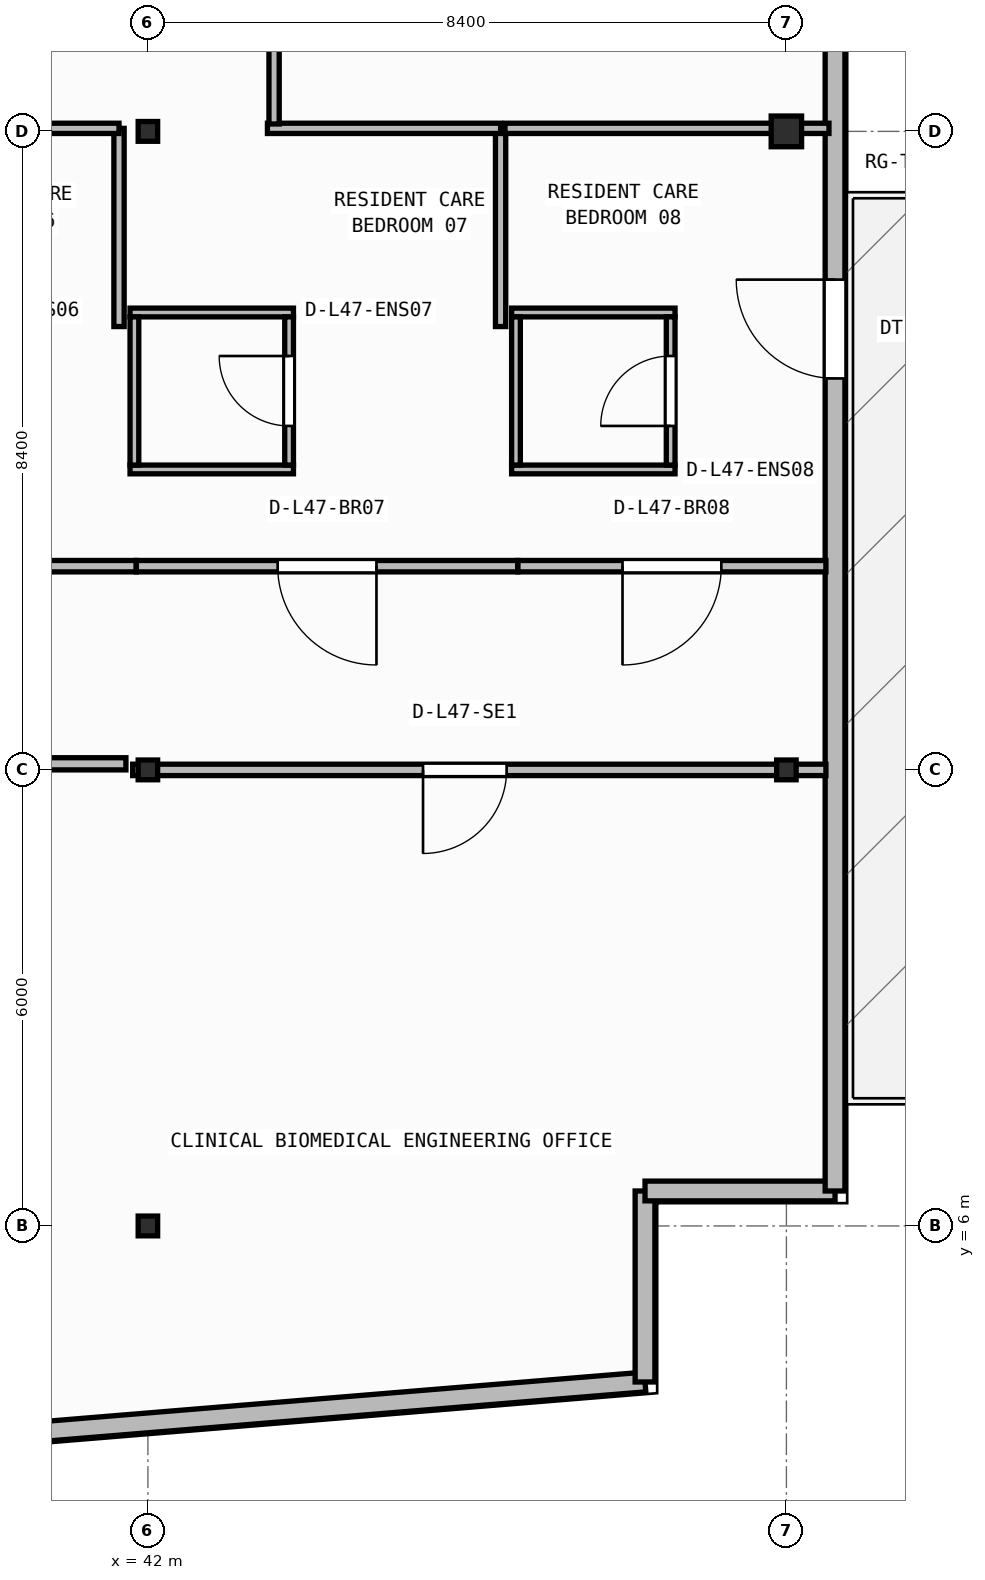
"""IFC4 building model, lengths in metres.
Left out: names, types, materials, properties, quantities, classifications, styles, units other than length and angle.
Written with IfcOpenShell. Run it as: python <this file> out.ifc"""

import sys

from ifc_helpers import new_model, si_unit, direction, frame, frame_2d, origin, origin_2d, place, context, subcontext, project, spatial, rectangle, i_section, extrude, element, fill, save


model = new_model("IFC4")
c1 = context("Model", 3, precision=1e-05, world=origin(), true_north=direction((0.0, 1.0)))
c2 = subcontext(c1, "Body", "Model", "MODEL_VIEW")
j1 = project(units=[si_unit("LENGTHUNIT", "METRE"), si_unit("PLANEANGLEUNIT", "RADIAN")], contexts=[c1])
p1 = place(None, origin())
s1 = spatial("IfcSite", under=j1, at=p1, CompositionType="ELEMENT")
p2 = place(p1, origin())
s2 = spatial("IfcBuilding", under=s1, at=p2, CompositionType="ELEMENT")
p3 = place(p2, frame((0.0, 0.0, 192.1)))
s3 = spatial("IfcBuildingStorey", under=s2, at=p3, CompositionType="ELEMENT", Elevation=192.1)
for number, where, z_axis, x_axis in (
    (1, (42.0, 6.0, 0.0), (0.0, 0.0, 1.0), (1.0, 0.0, 0.0)),
    (2, (42.0, 12.0, 0.0), (0.0, 0.0, 1.0), (1.0, 0.0, 0.0)),
    (3, (50.4, 12.0, 0.0), (0.0, 0.0, 1.0), (1.0, 0.0, 0.0)),
    (4, (42.0, 20.4, 0.0), (0.0, 0.0, 1.0), (1.0, 0.0, 0.0)),
):
    element("IfcColumn", number, at=place(p3, frame(where, z_axis=z_axis, x_axis=x_axis)), inside=s3, PredefinedType="COLUMN", context=c2, shape_type="SweptSolid", body=[
        extrude(i_section(OverallWidth=0.256, OverallDepth=0.26, WebThickness=0.01, FlangeThickness=0.017, FilletRadius=0.013, at=origin_2d()), origin(), (0.0, 0.0, 1.0), 3.95),
    ])
p4 = place(p3, frame((50.4, 20.4, 0.0), z_axis=(0.0, 0.0, 1.0), x_axis=(1.0, 0.0, 0.0)))
e5 = element("IfcColumn", 5, at=p4, inside=s3, PredefinedType="COLUMN", context=c2, shape_type="SweptSolid", body=[
    extrude(i_section(OverallWidth=0.4, OverallDepth=0.404, WebThickness=0.02, FlangeThickness=0.032, at=origin_2d()), origin(), (0.0, 0.0, 1.0), 3.95),
])
p5 = place(p3, frame((2.66, 0.174, 0.0), z_axis=(0.0, 0.0, 1.0), x_axis=(0.996634028439, 0.081979347142, 0.0)))
e6 = element("IfcWall", 6, at=p5, inside=s3, PredefinedType="STANDARD", context=c2, shape_type="SweptSolid", body=[
    extrude(rectangle(XDim=46.035, YDim=0.26, at=frame_2d((23.018, 0.0))), origin(), (0.0, 0.0, 1.0), 3.71),
])
p6 = place(p5, frame((21.817, 0.0, 0.9)))
e7 = element("IfcOpeningElement", 7, at=p6, cuts=e6, PredefinedType="OPENING", context=c2, shape_type="SweptSolid", body=[
    extrude(rectangle(XDim=2.4, YDim=1.65, at=frame_2d((1.2, 0.825))), frame((0.0, 0.14, 0.0), z_axis=(0.0, -1.0, 0.0), x_axis=(1.0, 0.0, 0.0)), (0.0, 0.0, 1.0), 0.28),
])
p7 = place(p3, frame((48.54, 3.948, 0.0), z_axis=(0.0, 0.0, 1.0), x_axis=(0.0, 1.0, 0.0)))
e8 = element("IfcWall", 8, at=p7, inside=s3, PredefinedType="STANDARD", context=c2, shape_type="SweptSolid", body=[
    extrude(rectangle(XDim=2.512, YDim=0.26, at=frame_2d((1.256, 0.0))), origin(), (0.0, 0.0, 1.0), 3.71),
])
p8 = place(p3, frame((48.54, 6.46, 0.0), z_axis=(0.0, 0.0, 1.0), x_axis=(1.0, 0.0, 0.0)))
e9 = element("IfcWall", 9, at=p8, inside=s3, PredefinedType="STANDARD", context=c2, shape_type="SweptSolid", body=[
    extrude(rectangle(XDim=2.5, YDim=0.26, at=frame_2d((1.25, 0.0))), origin(), (0.0, 0.0, 1.0), 3.71),
])
p9 = place(p3, frame((51.04, 6.46, 0.0), z_axis=(0.0, 0.0, 1.0), x_axis=(0.0, 1.0, 0.0)))
e10 = element("IfcWall", 10, at=p9, inside=s3, PredefinedType="STANDARD", context=c2, shape_type="SweptSolid", body=[
    extrude(rectangle(XDim=22.68, YDim=0.26, at=frame_2d((11.34, 0.0))), origin(), (0.0, 0.0, 1.0), 3.71),
])
p10 = place(p9, frame((10.69, 0.0, 0.0)))
e11 = element("IfcOpeningElement", 11, at=p10, cuts=e10, PredefinedType="OPENING", context=c2, shape_type="SweptSolid", body=[
    extrude(rectangle(XDim=1.3, YDim=2.15, at=frame_2d((0.65, 1.075))), frame((0.0, 0.14, 0.0), z_axis=(0.0, -1.0, 0.0), x_axis=(1.0, 0.0, 0.0)), (0.0, 0.0, 1.0), 0.28),
])
p11 = place(p3, frame((41.765, 15.952, 0.0), z_axis=(0.0, 0.0, 1.0), x_axis=(1.0, 0.0, 0.0)))
e12 = element("IfcWall", 12, at=p11, inside=s3, PredefinedType="PARTITIONING", context=c2, shape_type="SweptSolid", body=[
    extrude(rectangle(XDim=2.15, YDim=0.115, at=frame_2d((1.075, 0.0))), origin(), (0.0, 0.0, 1.0), 3.329),
])
p12 = place(p3, frame((41.765, 18.018, 0.0), z_axis=(0.0, 0.0, 1.0), x_axis=(1.0, 0.0, 0.0)))
e13 = element("IfcWall", 13, at=p12, inside=s3, PredefinedType="PARTITIONING", context=c2, shape_type="SweptSolid", body=[
    extrude(rectangle(XDim=2.15, YDim=0.115, at=frame_2d((1.075, 0.0))), origin(), (0.0, 0.0, 1.0), 3.71),
])
p13 = place(p3, frame((41.823, 16.01, 0.0), z_axis=(0.0, 0.0, 1.0), x_axis=(0.0, 1.0, 0.0)))
e14 = element("IfcWall", 14, at=p13, inside=s3, PredefinedType="PARTITIONING", context=c2, shape_type="SweptSolid", body=[
    extrude(rectangle(XDim=1.95, YDim=0.115, at=frame_2d((0.975, 0.0))), origin(), (0.0, 0.0, 1.0), 3.152),
])
p14 = place(p3, frame((43.857, 16.01, 0.0), z_axis=(0.0, 0.0, 1.0), x_axis=(0.0, 1.0, 0.0)))
e15 = element("IfcWall", 15, at=p14, inside=s3, PredefinedType="PARTITIONING", context=c2, shape_type="SweptSolid", body=[
    extrude(rectangle(XDim=1.95, YDim=0.115, at=frame_2d((0.975, 0.0))), origin(), (0.0, 0.0, 1.0), 3.71),
])
p15 = place(p14, frame((0.515, 0.0, 0.0)))
e16 = element("IfcOpeningElement", 16, at=p15, cuts=e15, PredefinedType="OPENING", context=c2, shape_type="SweptSolid", body=[
    extrude(rectangle(XDim=0.92, YDim=2.1, at=frame_2d((0.46, 1.05))), frame((0.0, 0.067, 0.0), z_axis=(0.0, -1.0, 0.0), x_axis=(1.0, 0.0, 0.0)), (0.0, 0.0, 1.0), 0.135),
])
p16 = place(p3, frame((46.785, 15.952, 0.0), z_axis=(0.0, 0.0, 1.0), x_axis=(1.0, 0.0, 0.0)))
e17 = element("IfcWall", 17, at=p16, inside=s3, PredefinedType="PARTITIONING", context=c2, shape_type="SweptSolid", body=[
    extrude(rectangle(XDim=2.15, YDim=0.115, at=frame_2d((1.075, 0.0))), origin(), (0.0, 0.0, 1.0), 3.329),
])
p17 = place(p3, frame((46.785, 18.018, 0.0), z_axis=(0.0, 0.0, 1.0), x_axis=(1.0, 0.0, 0.0)))
e18 = element("IfcWall", 18, at=p17, inside=s3, PredefinedType="PARTITIONING", context=c2, shape_type="SweptSolid", body=[
    extrude(rectangle(XDim=2.15, YDim=0.115, at=frame_2d((1.075, 0.0))), origin(), (0.0, 0.0, 1.0), 3.71),
])
p18 = place(p3, frame((46.843, 16.01, 0.0), z_axis=(0.0, 0.0, 1.0), x_axis=(0.0, 1.0, 0.0)))
e19 = element("IfcWall", 19, at=p18, inside=s3, PredefinedType="PARTITIONING", context=c2, shape_type="SweptSolid", body=[
    extrude(rectangle(XDim=1.95, YDim=0.115, at=frame_2d((0.975, 0.0))), origin(), (0.0, 0.0, 1.0), 3.71),
])
p19 = place(p3, frame((48.877, 16.01, 0.0), z_axis=(0.0, 0.0, 1.0), x_axis=(0.0, 1.0, 0.0)))
e20 = element("IfcWall", 20, at=p19, inside=s3, PredefinedType="PARTITIONING", context=c2, shape_type="SweptSolid", body=[
    extrude(rectangle(XDim=1.95, YDim=0.115, at=frame_2d((0.975, 0.0))), origin(), (0.0, 0.0, 1.0), 3.71),
])
p20 = place(p19, frame((0.515, 0.0, 0.0)))
e21 = element("IfcOpeningElement", 21, at=p20, cuts=e20, PredefinedType="OPENING", context=c2, shape_type="SweptSolid", body=[
    extrude(rectangle(XDim=0.92, YDim=2.1, at=frame_2d((0.46, 1.05))), frame((0.0, 0.067, 0.0), z_axis=(0.0, -1.0, 0.0), x_axis=(1.0, 0.0, 0.0)), (0.0, 0.0, 1.0), 0.135),
])
p21 = place(p3, frame((50.92, 12.0, 0.0), z_axis=(0.0, 0.0, 1.0), x_axis=(-1.0, 0.0, 0.0)))
e22 = element("IfcWall", 22, at=p21, inside=s3, PredefinedType="PARTITIONING", context=c2, shape_type="SweptSolid", body=[
    extrude(rectangle(XDim=9.12, YDim=0.15, at=frame_2d((4.56, 0.0))), origin(), (0.0, 0.0, 1.0), 3.152),
])
p22 = place(p21, frame((4.2, 0.0, 0.0)))
e23 = element("IfcOpeningElement", 23, at=p22, cuts=e22, PredefinedType="OPENING", context=c2, shape_type="SweptSolid", body=[
    extrude(rectangle(XDim=1.1, YDim=2.1, at=frame_2d((0.55, 1.05))), frame((0.0, 0.085, 0.0), z_axis=(0.0, -1.0, 0.0), x_axis=(1.0, 0.0, 0.0)), (0.0, 0.0, 1.0), 0.17),
])
p23 = place(p3, frame((41.846, 14.68, 0.0), z_axis=(0.0, 0.0, 1.0), x_axis=(-1.0, 0.0, 0.0)))
e24 = element("IfcWall", 24, at=p23, inside=s3, PredefinedType="PARTITIONING", context=c2, shape_type="SweptSolid", body=[
    extrude(rectangle(XDim=4.648, YDim=0.15, at=frame_2d((2.324, 0.0))), origin(), (0.0, 0.0, 1.0), 3.71),
])
p24 = place(p23, frame((1.674, 0.0, 0.0)))
e25 = element("IfcOpeningElement", 25, at=p24, cuts=e24, PredefinedType="OPENING", context=c2, shape_type="SweptSolid", body=[
    extrude(rectangle(XDim=1.3, YDim=2.15, at=frame_2d((0.65, 1.075))), frame((0.0, 0.085, 0.0), z_axis=(0.0, -1.0, 0.0), x_axis=(1.0, 0.0, 0.0)), (0.0, 0.0, 1.0), 0.17),
])
p25 = place(p3, frame((46.866, 14.68, 0.0), z_axis=(0.0, 0.0, 1.0), x_axis=(-1.0, 0.0, 0.0)))
e26 = element("IfcWall", 26, at=p25, inside=s3, PredefinedType="PARTITIONING", context=c2, shape_type="SweptSolid", body=[
    extrude(rectangle(XDim=5.018, YDim=0.15, at=frame_2d((2.509, 0.0))), origin(), (0.0, 0.0, 1.0), 3.71),
])
p26 = place(p25, frame((1.859, 0.0, 0.0)))
e27 = element("IfcOpeningElement", 27, at=p26, cuts=e26, PredefinedType="OPENING", context=c2, shape_type="SweptSolid", body=[
    extrude(rectangle(XDim=1.3, YDim=2.15, at=frame_2d((0.65, 1.075))), frame((0.0, 0.085, 0.0), z_axis=(0.0, -1.0, 0.0), x_axis=(1.0, 0.0, 0.0)), (0.0, 0.0, 1.0), 0.17),
])
p27 = place(p3, frame((50.92, 14.68, 0.0), z_axis=(0.0, 0.0, 1.0), x_axis=(-1.0, 0.0, 0.0)))
e28 = element("IfcWall", 28, at=p27, inside=s3, PredefinedType="PARTITIONING", context=c2, shape_type="SweptSolid", body=[
    extrude(rectangle(XDim=4.052, YDim=0.15, at=frame_2d((2.026, 0.0))), origin(), (0.0, 0.0, 1.0), 3.71),
])
p28 = place(p27, frame((1.376, 0.0, 0.0)))
e29 = element("IfcOpeningElement", 29, at=p28, cuts=e28, PredefinedType="OPENING", context=c2, shape_type="SweptSolid", body=[
    extrude(rectangle(XDim=1.3, YDim=2.15, at=frame_2d((0.65, 1.075))), frame((0.0, 0.085, 0.0), z_axis=(0.0, -1.0, 0.0), x_axis=(1.0, 0.0, 0.0)), (0.0, 0.0, 1.0), 0.17),
])
p29 = place(p3, frame((41.62, 17.833, 0.0), z_axis=(0.0, 0.0, 1.0), x_axis=(0.0, 1.0, 0.0)))
e30 = element("IfcWall", 30, at=p29, inside=s3, PredefinedType="PARTITIONING", context=c2, shape_type="SweptSolid", body=[
    extrude(rectangle(XDim=2.607, YDim=0.135, at=frame_2d((1.304, 0.0))), origin(), (0.0, 0.0, 1.0), 3.152),
])
p30 = place(p3, frame((41.62, 20.44, 0.0), z_axis=(0.0, 0.0, 1.0), x_axis=(-1.0, 0.0, 0.0)))
e31 = element("IfcWall", 31, at=p30, inside=s3, PredefinedType="PARTITIONING", context=c2, shape_type="SweptSolid", body=[
    extrude(rectangle(XDim=4.593, YDim=0.135, at=frame_2d((2.296, 0.0))), origin(), (0.0, 0.0, 1.0), 3.152),
])
p31 = place(p3, frame((46.64, 17.833, 0.0), z_axis=(0.0, 0.0, 1.0), x_axis=(0.0, 1.0, 0.0)))
e32 = element("IfcWall", 32, at=p31, inside=s3, PredefinedType="PARTITIONING", context=c2, shape_type="SweptSolid", body=[
    extrude(rectangle(XDim=2.607, YDim=0.135, at=frame_2d((1.304, 0.0))), origin(), (0.0, 0.0, 1.0), 3.71),
])
p32 = place(p3, frame((46.64, 20.44, 0.0), z_axis=(0.0, 0.0, 1.0), x_axis=(-1.0, 0.0, 0.0)))
e33 = element("IfcWall", 33, at=p32, inside=s3, PredefinedType="PARTITIONING", context=c2, shape_type="SweptSolid", body=[
    extrude(rectangle(XDim=3.067, YDim=0.135, at=frame_2d((1.534, 0.0))), origin(), (0.0, 0.0, 1.0), 3.152),
])
p33 = place(p3, frame((50.96, 20.44, 0.0), z_axis=(0.0, 0.0, 1.0), x_axis=(-1.0, 0.0, 0.0)))
e34 = element("IfcWall", 34, at=p33, inside=s3, PredefinedType="PARTITIONING", context=c2, shape_type="SweptSolid", body=[
    extrude(rectangle(XDim=4.262, YDim=0.135, at=frame_2d((2.131, 0.0))), origin(), (0.0, 0.0, 1.0), 3.152),
])
p34 = place(p3, frame((43.66, 20.498, 0.0), z_axis=(0.0, 0.0, 1.0), x_axis=(0.0, 1.0, 0.0)))
e35 = element("IfcWall", 35, at=p34, inside=s3, PredefinedType="PARTITIONING", context=c2, shape_type="SweptSolid", body=[
    extrude(rectangle(XDim=6.642, YDim=0.135, at=frame_2d((3.321, 0.0))), origin(), (0.0, 0.0, 1.0), 3.71),
])
p35 = place(p34, frame((3.542, 0.0, 0.0)))
e36 = element("IfcOpeningElement", 36, at=p35, cuts=e35, PredefinedType="OPENING", context=c2, shape_type="SweptSolid", body=[
    extrude(rectangle(XDim=1.1, YDim=2.1, at=frame_2d((0.55, 1.05))), frame((0.0, 0.077, 0.0), z_axis=(0.0, -1.0, 0.0), x_axis=(1.0, 0.0, 0.0)), (0.0, 0.0, 1.0), 0.155),
])
p36 = place(p3, frame((39.839, 12.08, 0.0), z_axis=(0.0, 0.0, 1.0), x_axis=(1.0, 0.0, 0.0)))
e37 = element("IfcWall", 37, at=p36, inside=s3, PredefinedType="PARTITIONING", context=c2, shape_type="SweptSolid", body=[
    extrude(rectangle(XDim=1.871, YDim=0.16, at=frame_2d((0.936, 0.0))), origin(), (0.0, 0.0, 1.0), 3.152),
])
p37 = place(p10, origin())
e38 = element("IfcDoor", 38, at=p37, inside=s3, OperationType="SINGLE_SWING_RIGHT", PredefinedType="DOOR", context=c2, shape_type="SweptSolid", body=[
    extrude(rectangle(XDim=1.3, YDim=2.15, at=frame_2d((0.65, 1.075))), frame((0.0, 0.025, 0.0), z_axis=(0.0, -1.0, 0.0), x_axis=(1.0, 0.0, 0.0)), (0.0, 0.0, 1.0), 0.05),
])
fill(e11, e38)
p38 = place(p15, origin())
e39 = element("IfcDoor", 39, at=p38, inside=s3, OperationType="SINGLE_SWING_RIGHT", PredefinedType="DOOR", context=c2, shape_type="SweptSolid", body=[
    extrude(rectangle(XDim=0.92, YDim=2.1, at=frame_2d((0.46, 1.05))), frame((0.0, 0.025, 0.0), z_axis=(0.0, -1.0, 0.0), x_axis=(1.0, 0.0, 0.0)), (0.0, 0.0, 1.0), 0.05),
])
fill(e16, e39)
p39 = place(p20, origin())
e40 = element("IfcDoor", 40, at=p39, inside=s3, OperationType="SINGLE_SWING_LEFT", PredefinedType="DOOR", context=c2, shape_type="SweptSolid", body=[
    extrude(rectangle(XDim=0.92, YDim=2.1, at=frame_2d((0.46, 1.05))), frame((0.0, 0.025, 0.0), z_axis=(0.0, -1.0, 0.0), x_axis=(1.0, 0.0, 0.0)), (0.0, 0.0, 1.0), 0.05),
])
fill(e21, e40)
p40 = place(p22, origin())
e41 = element("IfcDoor", 41, at=p40, inside=s3, OperationType="SINGLE_SWING_RIGHT", PredefinedType="DOOR", context=c2, shape_type="SweptSolid", body=[
    extrude(rectangle(XDim=1.1, YDim=2.1, at=frame_2d((0.55, 1.05))), frame((0.0, 0.025, 0.0), z_axis=(0.0, -1.0, 0.0), x_axis=(1.0, 0.0, 0.0)), (0.0, 0.0, 1.0), 0.05),
])
fill(e23, e41)
p41 = place(p26, origin())
e42 = element("IfcDoor", 42, at=p41, inside=s3, OperationType="SINGLE_SWING_LEFT", PredefinedType="DOOR", context=c2, shape_type="SweptSolid", body=[
    extrude(rectangle(XDim=1.3, YDim=2.15, at=frame_2d((0.65, 1.075))), frame((0.0, 0.025, 0.0), z_axis=(0.0, -1.0, 0.0), x_axis=(1.0, 0.0, 0.0)), (0.0, 0.0, 1.0), 0.05),
])
fill(e27, e42)
p42 = place(p28, origin())
e43 = element("IfcDoor", 43, at=p42, inside=s3, OperationType="SINGLE_SWING_RIGHT", PredefinedType="DOOR", context=c2, shape_type="SweptSolid", body=[
    extrude(rectangle(XDim=1.3, YDim=2.15, at=frame_2d((0.65, 1.075))), frame((0.0, 0.025, 0.0), z_axis=(0.0, -1.0, 0.0), x_axis=(1.0, 0.0, 0.0)), (0.0, 0.0, 1.0), 0.05),
])
fill(e29, e43)
save(model, sys.argv[1])
